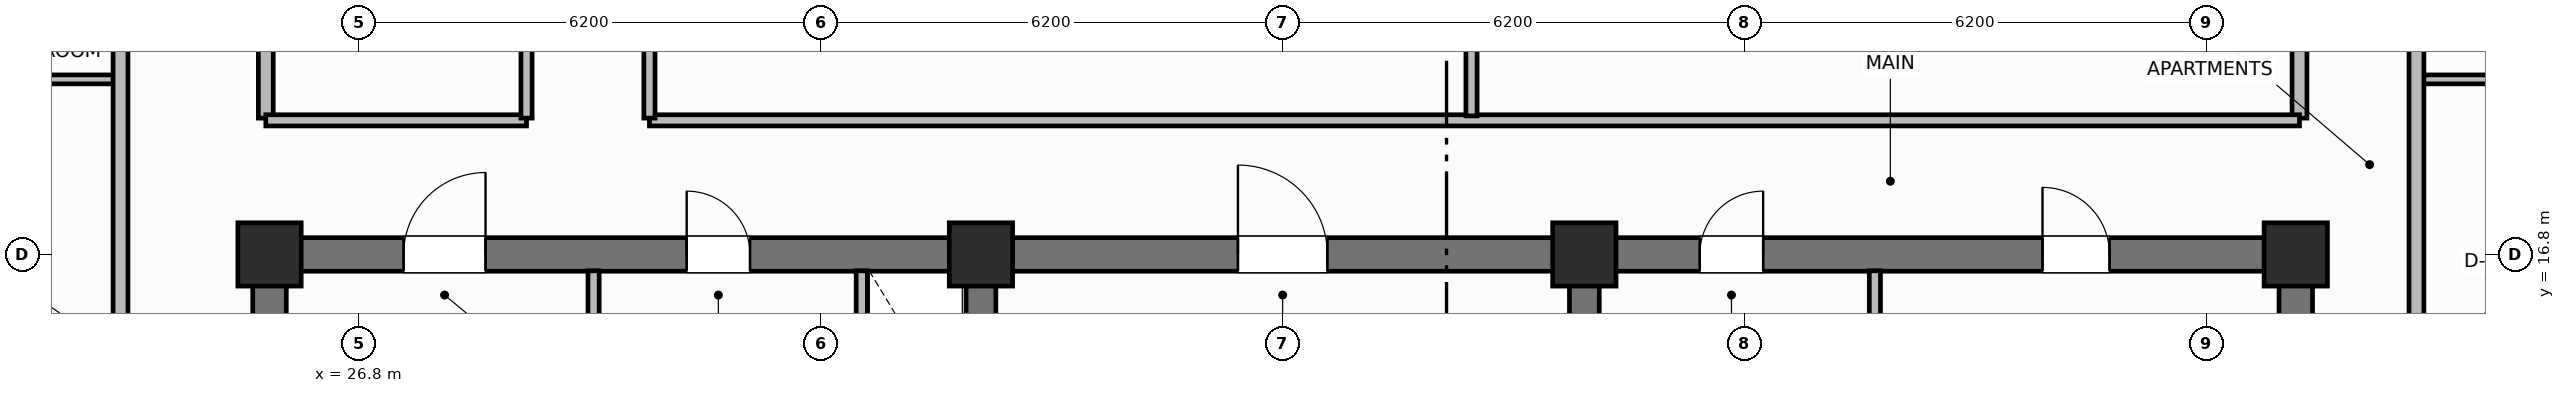
"""IFC4 building model, lengths in metres.
Left out: names, types, materials, properties, quantities, classifications, styles, units other than length and angle.
Written with IfcOpenShell. Run it as: python <this file> out.ifc"""

import sys

from ifc_helpers import new_model, si_unit, direction, frame, frame_2d, origin, origin_2d, place, context, subcontext, project, spatial, rectangle, extrude, element, fill, save


model = new_model("IFC4")
c1 = context("Model", 3, precision=1e-05, world=origin(), true_north=direction((0.0, 1.0)))
c2 = subcontext(c1, "Body", "Model", "MODEL_VIEW")
j1 = project(units=[si_unit("LENGTHUNIT", "METRE"), si_unit("PLANEANGLEUNIT", "RADIAN")], contexts=[c1])
p1 = place(None, origin())
s1 = spatial("IfcSite", under=j1, at=p1, CompositionType="ELEMENT")
p2 = place(p1, origin())
s2 = spatial("IfcBuilding", under=s1, at=p2, CompositionType="ELEMENT")
p3 = place(p2, frame((0.0, 0.0, 248.0)))
s3 = spatial("IfcBuildingStorey", under=s2, at=p3, CompositionType="ELEMENT", Elevation=248.0)
for number, where, z_axis, x_axis in (
    (1, (25.6, 10.825, 0.0), (0.0, 0.0, 1.0), (0.0, 1.0, 0.0)),
    (2, (52.8, 10.825, 0.0), (0.0, 0.0, 1.0), (0.0, 1.0, 0.0)),
):
    element("IfcWall", number, at=place(p3, frame(where, z_axis=z_axis, x_axis=x_axis)), inside=s3, PredefinedType="SHEAR", context=c2, shape_type="SweptSolid", body=[
        extrude(rectangle(XDim=5.75, YDim=0.45, at=frame_2d((2.875, 0.0))), origin(), (0.0, 0.0, 1.0), 3.7),
    ])
p4 = place(p3, frame((25.6, 16.8, 0.0), z_axis=(0.0, 0.0, 1.0), x_axis=(1.0, 0.0, 0.0)))
e3 = element("IfcWall", 3, at=p4, inside=s3, PredefinedType="SHEAR", context=c2, shape_type="SweptSolid", body=[
    extrude(rectangle(XDim=27.2, YDim=0.45, at=frame_2d((13.6, 0.0))), origin(), (0.0, 0.0, 1.0), 3.7),
])
p5 = place(p4, frame((1.8, 0.0, 0.0)))
e4 = element("IfcOpeningElement", 4, at=p5, cuts=e3, PredefinedType="OPENING", context=c2, shape_type="SweptSolid", body=[
    extrude(rectangle(XDim=1.1, YDim=2.15, at=frame_2d((0.55, 1.075))), frame((0.0, 0.235, 0.0), z_axis=(0.0, -1.0, 0.0), x_axis=(1.0, 0.0, 0.0)), (0.0, 0.0, 1.0), 0.47),
])
p6 = place(p4, frame((5.6, 0.0, 0.0)))
e5 = element("IfcOpeningElement", 5, at=p6, cuts=e3, PredefinedType="OPENING", context=c2, shape_type="SweptSolid", body=[
    extrude(rectangle(XDim=0.85, YDim=2.1, at=frame_2d((0.425, 1.05))), frame((0.0, 0.235, 0.0), z_axis=(0.0, -1.0, 0.0), x_axis=(1.0, 0.0, 0.0)), (0.0, 0.0, 1.0), 0.47),
])
p7 = place(p4, frame((13.0, 0.0, 0.0)))
e6 = element("IfcOpeningElement", 6, at=p7, cuts=e3, PredefinedType="OPENING", context=c2, shape_type="SweptSolid", body=[
    extrude(rectangle(XDim=1.2, YDim=2.15, at=frame_2d((0.6, 1.075))), frame((0.0, 0.235, 0.0), z_axis=(0.0, -1.0, 0.0), x_axis=(1.0, 0.0, 0.0)), (0.0, 0.0, 1.0), 0.47),
])
p8 = place(p4, frame((19.2, 0.0, 0.0)))
e7 = element("IfcOpeningElement", 7, at=p8, cuts=e3, PredefinedType="OPENING", context=c2, shape_type="SweptSolid", body=[
    extrude(rectangle(XDim=0.85, YDim=2.1, at=frame_2d((0.425, 1.05))), frame((0.0, 0.235, 0.0), z_axis=(0.0, -1.0, 0.0), x_axis=(1.0, 0.0, 0.0)), (0.0, 0.0, 1.0), 0.47),
])
p9 = place(p4, frame((23.8, 0.0, 0.0)))
e8 = element("IfcOpeningElement", 8, at=p9, cuts=e3, PredefinedType="OPENING", context=c2, shape_type="SweptSolid", body=[
    extrude(rectangle(XDim=0.9, YDim=2.1, at=frame_2d((0.45, 1.05))), frame((0.0, 0.235, 0.0), z_axis=(0.0, -1.0, 0.0), x_axis=(1.0, 0.0, 0.0)), (0.0, 0.0, 1.0), 0.47),
])
for number, where, z_axis, x_axis in (
    (9, (35.15, 10.825, 0.0), (0.0, 0.0, 1.0), (0.0, 1.0, 0.0)),
    (10, (43.25, 10.825, 0.0), (0.0, 0.0, 1.0), (0.0, 1.0, 0.0)),
):
    element("IfcWall", number, at=place(p3, frame(where, z_axis=z_axis, x_axis=x_axis)), inside=s3, PredefinedType="SHEAR", context=c2, shape_type="SweptSolid", body=[
        extrude(rectangle(XDim=5.75, YDim=0.4, at=frame_2d((2.875, 0.0))), origin(), (0.0, 0.0, 1.0), 3.7),
    ])
for number, where, z_axis, x_axis in (
    (11, (25.6, 16.8, 0.0), (0.0, 0.0, 1.0), (1.0, 0.0, 0.0)),
    (12, (35.15, 16.8, 0.0), (0.0, 0.0, 1.0), (1.0, 0.0, 0.0)),
    (13, (43.25, 16.8, 0.0), (0.0, 0.0, 1.0), (1.0, 0.0, 0.0)),
    (14, (52.8, 16.8, 0.0), (0.0, 0.0, 1.0), (1.0, 0.0, 0.0)),
):
    element("IfcColumn", number, at=place(p3, frame(where, z_axis=z_axis, x_axis=x_axis)), inside=s3, PredefinedType="COLUMN", context=c2, shape_type="SweptSolid", body=[
        extrude(rectangle(XDim=0.85, YDim=0.85, at=origin_2d()), origin(), (0.0, 0.0, 1.0), 3.7),
    ])
p10 = place(p3, frame((29.95, 14.5, 0.0), z_axis=(0.0, 0.0, 1.0), x_axis=(0.0, 1.0, 0.0)))
e15 = element("IfcWall", 15, at=p10, inside=s3, PredefinedType="PARTITIONING", context=c2, shape_type="SweptSolid", body=[
    extrude(rectangle(XDim=2.08, YDim=0.15, at=frame_2d((1.04, 0.0))), origin(), (0.0, 0.0, 1.0), 2.56),
])
p11 = place(p3, frame((33.55, 14.5, 0.0), z_axis=(0.0, 0.0, 1.0), x_axis=(0.0, 1.0, 0.0)))
e16 = element("IfcWall", 16, at=p11, inside=s3, PredefinedType="PARTITIONING", context=c2, shape_type="SweptSolid", body=[
    extrude(rectangle(XDim=2.08, YDim=0.15, at=frame_2d((1.04, 0.0))), origin(), (0.0, 0.0, 1.0), 2.56),
])
p12 = place(p11, frame((0.55, 0.0, 0.0)))
e17 = element("IfcOpeningElement", 17, at=p12, cuts=e16, PredefinedType="OPENING", context=c2, shape_type="SweptSolid", body=[
    extrude(rectangle(XDim=0.85, YDim=2.05, at=frame_2d((0.425, 1.025))), frame((0.0, 0.085, 0.0), z_axis=(0.0, -1.0, 0.0), x_axis=(1.0, 0.0, 0.0)), (0.0, 0.0, 1.0), 0.17),
])
p13 = place(p3, frame((47.15, 10.95, 0.0), z_axis=(0.0, 0.0, 1.0), x_axis=(0.0, 1.0, 0.0)))
e18 = element("IfcWall", 18, at=p13, inside=s3, PredefinedType="PARTITIONING", context=c2, shape_type="SweptSolid", body=[
    extrude(rectangle(XDim=5.63, YDim=0.15, at=frame_2d((2.815, 0.0))), origin(), (0.0, 0.0, 1.0), 2.56),
])
for number, where, z_axis, x_axis in (
    (19, (25.55, 18.63, 0.0), (0.0, 0.0, 1.0), (0.0, 1.0, 0.0)),
    (20, (52.85, 18.63, 0.0), (0.0, 0.0, 1.0), (0.0, 1.0, 0.0)),
):
    element("IfcWall", number, at=place(p3, frame(where, z_axis=z_axis, x_axis=x_axis)), inside=s3, PredefinedType="PARTITIONING", context=c2, shape_type="SweptSolid", body=[
        extrude(rectangle(XDim=19.14, YDim=0.2, at=frame_2d((9.57, 0.0))), origin(), (0.0, 0.0, 1.0), 2.56),
    ])
p14 = place(p3, frame((25.55, 18.6, 0.0), z_axis=(0.0, 0.0, 1.0), x_axis=(1.0, 0.0, 0.0)))
e21 = element("IfcWall", 21, at=p14, inside=s3, PredefinedType="PARTITIONING", context=c2, shape_type="SweptSolid", body=[
    extrude(rectangle(XDim=3.5, YDim=0.15, at=frame_2d((1.75, 0.0))), origin(), (0.0, 0.0, 1.0), 2.56),
])
p15 = place(p3, frame((30.7, 18.6, 0.0), z_axis=(0.0, 0.0, 1.0), x_axis=(1.0, 0.0, 0.0)))
e22 = element("IfcWall", 22, at=p15, inside=s3, PredefinedType="PARTITIONING", context=c2, shape_type="SweptSolid", body=[
    extrude(rectangle(XDim=22.15, YDim=0.15, at=frame_2d((11.075, 0.0))), origin(), (0.0, 0.0, 1.0), 2.56),
])
p16 = place(p3, frame((41.735, 18.66, 0.0), z_axis=(0.0, 0.0, 1.0), x_axis=(0.0, 1.0, 0.0)))
e23 = element("IfcWall", 23, at=p16, inside=s3, PredefinedType="PARTITIONING", context=c2, shape_type="SweptSolid", body=[
    extrude(rectangle(XDim=19.08, YDim=0.15, at=frame_2d((9.54, 0.0))), origin(), (0.0, 0.0, 1.0), 2.56),
])
p17 = place(p16, frame((6.5, 0.0, 0.0)))
e24 = element("IfcOpeningElement", 24, at=p17, cuts=e23, PredefinedType="OPENING", context=c2, shape_type="SweptSolid", body=[
    extrude(rectangle(XDim=1.0, YDim=2.15, at=frame_2d((0.5, 1.075))), frame((0.0, 0.085, 0.0), z_axis=(0.0, -1.0, 0.0), x_axis=(1.0, 0.0, 0.0)), (0.0, 0.0, 1.0), 0.17),
])
p18 = place(p3, frame((29.05, 18.63, 0.0), z_axis=(0.0, 0.0, 1.0), x_axis=(0.0, 1.0, 0.0)))
e25 = element("IfcWall", 25, at=p18, inside=s3, PredefinedType="PARTITIONING", context=c2, shape_type="SweptSolid", body=[
    extrude(rectangle(XDim=19.14, YDim=0.15, at=frame_2d((9.57, 0.0))), origin(), (0.0, 0.0, 1.0), 2.56),
])
p19 = place(p18, frame((5.5, 0.0, 0.0)))
e26 = element("IfcOpeningElement", 26, at=p19, cuts=e25, PredefinedType="OPENING", context=c2, shape_type="SweptSolid", body=[
    extrude(rectangle(XDim=1.0, YDim=2.15, at=frame_2d((0.5, 1.075))), frame((0.0, 0.085, 0.0), z_axis=(0.0, -1.0, 0.0), x_axis=(1.0, 0.0, 0.0)), (0.0, 0.0, 1.0), 0.17),
])
p20 = place(p3, frame((30.7, 18.63, 0.0), z_axis=(0.0, 0.0, 1.0), x_axis=(0.0, 1.0, 0.0)))
e27 = element("IfcWall", 27, at=p20, inside=s3, PredefinedType="PARTITIONING", context=c2, shape_type="SweptSolid", body=[
    extrude(rectangle(XDim=19.14, YDim=0.15, at=frame_2d((9.57, 0.0))), origin(), (0.0, 0.0, 1.0), 2.56),
])
p21 = place(p20, frame((5.5, 0.0, 0.0)))
e28 = element("IfcOpeningElement", 28, at=p21, cuts=e27, PredefinedType="OPENING", context=c2, shape_type="SweptSolid", body=[
    extrude(rectangle(XDim=1.0, YDim=2.15, at=frame_2d((0.5, 1.075))), frame((0.0, 0.085, 0.0), z_axis=(0.0, -1.0, 0.0), x_axis=(1.0, 0.0, 0.0)), (0.0, 0.0, 1.0), 0.17),
])
p22 = place(p3, frame((21.65, 19.15, 0.0), z_axis=(0.0, 0.0, 1.0), x_axis=(1.0, 0.0, 0.0)))
e29 = element("IfcWall", 29, at=p22, inside=s3, PredefinedType="PARTITIONING", context=c2, shape_type="SweptSolid", body=[
    extrude(rectangle(XDim=1.95, YDim=0.12, at=frame_2d((0.975, 0.0))), origin(), (0.0, 0.0, 1.0), 2.56),
])
p23 = place(p3, frame((23.6, 9.95, 0.0), z_axis=(0.0, 0.0, 1.0), x_axis=(0.0, 1.0, 0.0)))
e30 = element("IfcWall", 30, at=p23, inside=s3, PredefinedType="PARTITIONING", context=c2, shape_type="SweptSolid", body=[
    extrude(rectangle(XDim=36.5, YDim=0.2, at=frame_2d((18.25, 0.0))), origin(), (0.0, 0.0, 1.0), 2.56),
])
p24 = place(p23, frame((3.25, 0.0, 0.0)))
e31 = element("IfcOpeningElement", 31, at=p24, cuts=e30, PredefinedType="OPENING", context=c2, shape_type="SweptSolid", body=[
    extrude(rectangle(XDim=1.0, YDim=2.15, at=frame_2d((0.5, 1.075))), frame((0.0, 0.11, 0.0), z_axis=(0.0, -1.0, 0.0), x_axis=(1.0, 0.0, 0.0)), (0.0, 0.0, 1.0), 0.22),
])
p25 = place(p23, frame((23.5, 0.0, 0.0)))
e32 = element("IfcOpeningElement", 32, at=p25, cuts=e30, PredefinedType="OPENING", context=c2, shape_type="SweptSolid", body=[
    extrude(rectangle(XDim=1.0, YDim=2.15, at=frame_2d((0.5, 1.075))), frame((0.0, 0.11, 0.0), z_axis=(0.0, -1.0, 0.0), x_axis=(1.0, 0.0, 0.0)), (0.0, 0.0, 1.0), 0.22),
])
p26 = place(p3, frame((54.42, 19.15, 0.0), z_axis=(0.0, 0.0, 1.0), x_axis=(1.0, 0.0, 0.0)))
e33 = element("IfcWall", 33, at=p26, inside=s3, PredefinedType="PARTITIONING", context=c2, shape_type="SweptSolid", body=[
    extrude(rectangle(XDim=1.95, YDim=0.12, at=frame_2d((0.975, 0.0))), origin(), (0.0, 0.0, 1.0), 2.56),
])
p27 = place(p3, frame((54.42, 9.95, 0.0), z_axis=(0.0, 0.0, 1.0), x_axis=(0.0, 1.0, 0.0)))
e34 = element("IfcWall", 34, at=p27, inside=s3, PredefinedType="PARTITIONING", context=c2, shape_type="SweptSolid", body=[
    extrude(rectangle(XDim=36.5, YDim=0.2, at=frame_2d((18.25, 0.0))), origin(), (0.0, 0.0, 1.0), 2.56),
])
p28 = place(p27, frame((3.25, 0.0, 0.0)))
e35 = element("IfcOpeningElement", 35, at=p28, cuts=e34, PredefinedType="OPENING", context=c2, shape_type="SweptSolid", body=[
    extrude(rectangle(XDim=1.0, YDim=2.15, at=frame_2d((0.5, 1.075))), frame((0.0, 0.11, 0.0), z_axis=(0.0, -1.0, 0.0), x_axis=(1.0, 0.0, 0.0)), (0.0, 0.0, 1.0), 0.22),
])
p29 = place(p5, origin())
e36 = element("IfcDoor", 36, at=p29, inside=s3, OperationType="SINGLE_SWING_RIGHT", PredefinedType="DOOR", context=c2, shape_type="SweptSolid", body=[
    extrude(rectangle(XDim=1.1, YDim=2.15, at=frame_2d((0.55, 1.075))), frame((0.0, 0.025, 0.0), z_axis=(0.0, -1.0, 0.0), x_axis=(1.0, 0.0, 0.0)), (0.0, 0.0, 1.0), 0.05),
])
fill(e4, e36)
p30 = place(p6, origin())
e37 = element("IfcDoor", 37, at=p30, inside=s3, OperationType="SINGLE_SWING_LEFT", PredefinedType="DOOR", context=c2, shape_type="SweptSolid", body=[
    extrude(rectangle(XDim=0.85, YDim=2.1, at=frame_2d((0.425, 1.05))), frame((0.0, 0.025, 0.0), z_axis=(0.0, -1.0, 0.0), x_axis=(1.0, 0.0, 0.0)), (0.0, 0.0, 1.0), 0.05),
])
fill(e5, e37)
p31 = place(p7, origin())
e38 = element("IfcDoor", 38, at=p31, inside=s3, OperationType="SINGLE_SWING_LEFT", PredefinedType="DOOR", context=c2, shape_type="SweptSolid", body=[
    extrude(rectangle(XDim=1.2, YDim=2.15, at=frame_2d((0.6, 1.075))), frame((0.0, 0.025, 0.0), z_axis=(0.0, -1.0, 0.0), x_axis=(1.0, 0.0, 0.0)), (0.0, 0.0, 1.0), 0.05),
])
fill(e6, e38)
p32 = place(p8, origin())
e39 = element("IfcDoor", 39, at=p32, inside=s3, OperationType="SINGLE_SWING_RIGHT", PredefinedType="DOOR", context=c2, shape_type="SweptSolid", body=[
    extrude(rectangle(XDim=0.85, YDim=2.1, at=frame_2d((0.425, 1.05))), frame((0.0, 0.025, 0.0), z_axis=(0.0, -1.0, 0.0), x_axis=(1.0, 0.0, 0.0)), (0.0, 0.0, 1.0), 0.05),
])
fill(e7, e39)
p33 = place(p9, origin())
e40 = element("IfcDoor", 40, at=p33, inside=s3, OperationType="SINGLE_SWING_LEFT", PredefinedType="DOOR", context=c2, shape_type="SweptSolid", body=[
    extrude(rectangle(XDim=0.9, YDim=2.1, at=frame_2d((0.45, 1.05))), frame((0.0, 0.025, 0.0), z_axis=(0.0, -1.0, 0.0), x_axis=(1.0, 0.0, 0.0)), (0.0, 0.0, 1.0), 0.05),
])
fill(e8, e40)
save(model, sys.argv[1])
